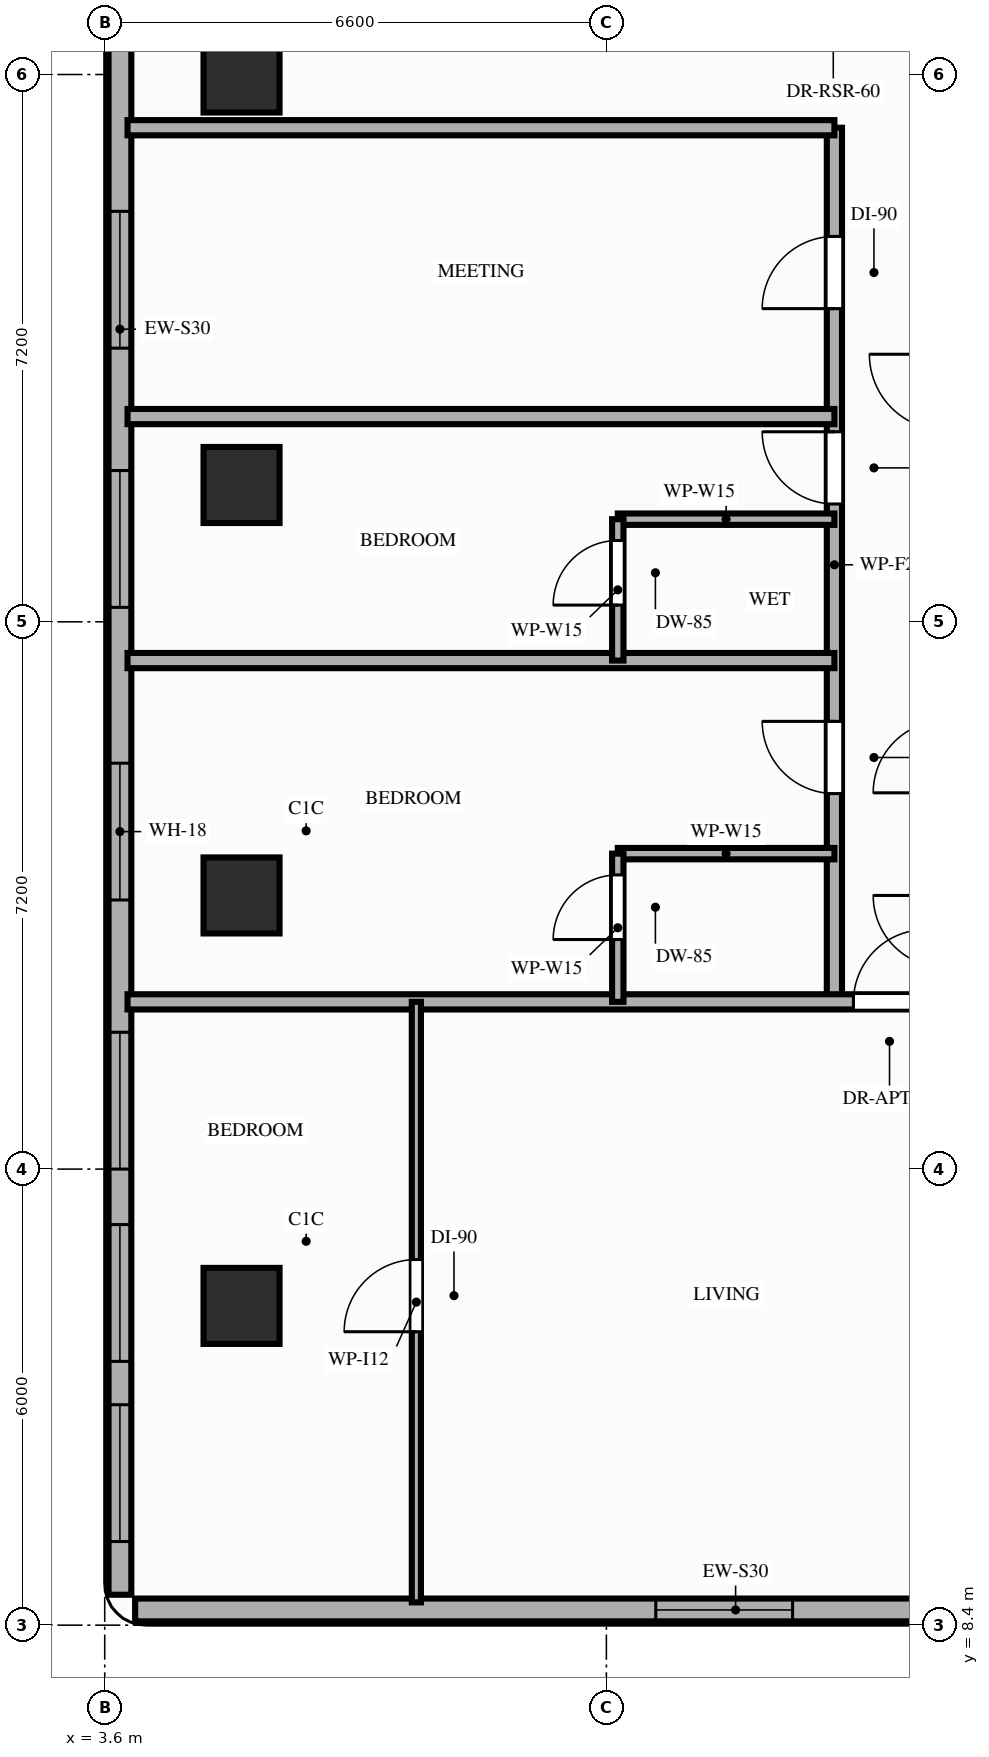
"""IFC4 building model, lengths in metres.
Left out: names, types, materials, properties, quantities, classifications, styles, units other than length and angle.
Written with IfcOpenShell. Run it as: python <this file> out.ifc"""

import sys

from ifc_helpers import new_model, si_unit, direction, frame, frame_2d, origin, origin_2d, place, context, subcontext, project, spatial, rectangle, extrude, element, fill, save


model = new_model("IFC4")
c1 = context("Model", 3, precision=1e-05, world=origin(), true_north=direction((0.0, 1.0)))
c2 = subcontext(c1, "Body", "Model", "MODEL_VIEW")
j1 = project(units=[si_unit("LENGTHUNIT", "METRE"), si_unit("PLANEANGLEUNIT", "RADIAN")], contexts=[c1])
p1 = place(None, origin())
s1 = spatial("IfcSite", under=j1, at=p1, CompositionType="ELEMENT")
p2 = place(p1, origin())
s2 = spatial("IfcBuilding", under=s1, at=p2, CompositionType="ELEMENT")
p3 = place(p2, frame((0.0, 0.0, 149.0)))
s3 = spatial("IfcBuildingStorey", under=s2, at=p3, CompositionType="ELEMENT", Elevation=149.0)
for number, where, z_axis, x_axis in (
    (1, (5.4, 12.6, 0.0), (0.0, 0.0, 1.0), (1.0, 0.0, 0.0)),
    (2, (5.4, 18.0, 0.0), (0.0, 0.0, 1.0), (1.0, 0.0, 0.0)),
    (3, (5.4, 23.4, 0.0), (0.0, 0.0, 1.0), (1.0, 0.0, 0.0)),
    (4, (5.4, 28.8, 0.0), (0.0, 0.0, 1.0), (1.0, 0.0, 0.0)),
):
    element("IfcColumn", number, at=place(p3, frame(where, z_axis=z_axis, x_axis=x_axis)), inside=s3, PredefinedType="COLUMN", context=c2, shape_type="SweptSolid", body=[
        extrude(rectangle(XDim=1.0, YDim=1.0, at=origin_2d()), origin(), (0.0, 0.0, 1.0), 3.2),
    ])
p4 = place(p3, frame((4.0, 8.6, 0.0), z_axis=(0.0, 0.0, 1.0), x_axis=(1.0, 0.0, 0.0)))
e5 = element("IfcWall", 5, at=p4, inside=s3, PredefinedType="STANDARD", context=c2, shape_type="SweptSolid", body=[
    extrude(rectangle(XDim=15.8, YDim=0.3, at=frame_2d((7.9, 0.0))), origin(), (0.0, 0.0, 1.0), 2.96),
])
p5 = place(p4, frame((6.85, 0.0, 0.85)))
e6 = element("IfcOpeningElement", 6, at=p5, cuts=e5, PredefinedType="OPENING", context=c2, shape_type="SweptSolid", body=[
    extrude(rectangle(XDim=1.8, YDim=1.75, at=frame_2d((0.9, 0.875))), frame((0.0, 0.16, 0.0), z_axis=(0.0, -1.0, 0.0), x_axis=(1.0, 0.0, 0.0)), (0.0, 0.0, 1.0), 0.32),
])
p6 = place(p3, frame((3.8, 42.1, 0.0), z_axis=(0.0, 0.0, 1.0), x_axis=(0.0, -1.0, 0.0)))
e7 = element("IfcWall", 7, at=p6, inside=s3, PredefinedType="STANDARD", context=c2, shape_type="SweptSolid", body=[
    extrude(rectangle(XDim=33.3, YDim=0.3, at=frame_2d((16.65, 0.0))), origin(), (0.0, 0.0, 1.0), 2.67),
])
p7 = place(p6, frame((22.36, 0.0, 0.85)))
e8 = element("IfcOpeningElement", 8, at=p7, cuts=e7, PredefinedType="OPENING", context=c2, shape_type="SweptSolid", body=[
    extrude(rectangle(XDim=1.8, YDim=1.57, at=frame_2d((0.9, 0.785))), frame((0.0, 0.16, 0.0), z_axis=(0.0, -1.0, 0.0), x_axis=(1.0, 0.0, 0.0)), (0.0, 0.0, 1.0), 0.32),
])
p8 = place(p6, frame((18.51, 0.0, 0.85)))
e9 = element("IfcOpeningElement", 9, at=p8, cuts=e7, PredefinedType="OPENING", context=c2, shape_type="SweptSolid", body=[
    extrude(rectangle(XDim=1.8, YDim=1.57, at=frame_2d((0.9, 0.785))), frame((0.0, 0.16, 0.0), z_axis=(0.0, -1.0, 0.0), x_axis=(1.0, 0.0, 0.0)), (0.0, 0.0, 1.0), 0.32),
])
p9 = place(p6, frame((28.43, 0.0, 0.85)))
e10 = element("IfcOpeningElement", 10, at=p9, cuts=e7, PredefinedType="OPENING", context=c2, shape_type="SweptSolid", body=[
    extrude(rectangle(XDim=1.8, YDim=1.57, at=frame_2d((0.9, 0.785))), frame((0.0, 0.16, 0.0), z_axis=(0.0, -1.0, 0.0), x_axis=(1.0, 0.0, 0.0)), (0.0, 0.0, 1.0), 0.32),
])
p10 = place(p6, frame((30.8, 0.0, 0.85)))
e11 = element("IfcOpeningElement", 11, at=p10, cuts=e7, PredefinedType="OPENING", context=c2, shape_type="SweptSolid", body=[
    extrude(rectangle(XDim=1.8, YDim=1.57, at=frame_2d((0.9, 0.785))), frame((0.0, 0.16, 0.0), z_axis=(0.0, -1.0, 0.0), x_axis=(1.0, 0.0, 0.0)), (0.0, 0.0, 1.0), 0.32),
])
p11 = place(p6, frame((25.9, 0.0, 0.85)))
e12 = element("IfcOpeningElement", 12, at=p11, cuts=e7, PredefinedType="OPENING", context=c2, shape_type="SweptSolid", body=[
    extrude(rectangle(XDim=1.8, YDim=1.57, at=frame_2d((0.9, 0.785))), frame((0.0, 0.16, 0.0), z_axis=(0.0, -1.0, 0.0), x_axis=(1.0, 0.0, 0.0)), (0.0, 0.0, 1.0), 0.32),
])
p12 = place(p6, frame((15.1, 0.0, 0.85)))
e13 = element("IfcOpeningElement", 13, at=p12, cuts=e7, PredefinedType="OPENING", context=c2, shape_type="SweptSolid", body=[
    extrude(rectangle(XDim=1.8, YDim=1.57, at=frame_2d((0.9, 0.785))), frame((0.0, 0.16, 0.0), z_axis=(0.0, -1.0, 0.0), x_axis=(1.0, 0.0, 0.0)), (0.0, 0.0, 1.0), 0.32),
])
p13 = place(p6, frame((9.9, 0.0, 0.85)))
e14 = element("IfcOpeningElement", 14, at=p13, cuts=e7, PredefinedType="OPENING", context=c2, shape_type="SweptSolid", body=[
    extrude(rectangle(XDim=1.8, YDim=1.57, at=frame_2d((0.9, 0.785))), frame((0.0, 0.16, 0.0), z_axis=(0.0, -1.0, 0.0), x_axis=(1.0, 0.0, 0.0)), (0.0, 0.0, 1.0), 0.32),
])
p14 = place(p6, frame((3.8, 0.0, 0.85)))
e15 = element("IfcOpeningElement", 15, at=p14, cuts=e7, PredefinedType="OPENING", context=c2, shape_type="SweptSolid", body=[
    extrude(rectangle(XDim=1.8, YDim=1.57, at=frame_2d((0.9, 0.785))), frame((0.0, 0.16, 0.0), z_axis=(0.0, -1.0, 0.0), x_axis=(1.0, 0.0, 0.0)), (0.0, 0.0, 1.0), 0.32),
])
p15 = place(p3, frame((13.2, 16.6, 0.0), z_axis=(0.0, 0.0, 1.0), x_axis=(0.0, 1.0, 0.0)))
e16 = element("IfcWall", 16, at=p15, inside=s3, PredefinedType="PARTITIONING", context=c2, shape_type="SweptSolid", body=[
    extrude(rectangle(XDim=11.5, YDim=0.2, at=frame_2d((5.75, 0.0))), origin(), (0.0, 0.0, 1.0), 2.4),
])
p16 = place(p15, frame((2.74, 0.0, 0.0)))
e17 = element("IfcOpeningElement", 17, at=p16, cuts=e16, PredefinedType="OPENING", context=c2, shape_type="SweptSolid", body=[
    extrude(rectangle(XDim=0.95, YDim=2.15, at=frame_2d((0.475, 1.075))), frame((0.0, 0.11, 0.0), z_axis=(0.0, -1.0, 0.0), x_axis=(1.0, 0.0, 0.0)), (0.0, 0.0, 1.0), 0.22),
])
p17 = place(p15, frame((6.55, 0.0, 0.0)))
e18 = element("IfcOpeningElement", 18, at=p17, cuts=e16, PredefinedType="OPENING", context=c2, shape_type="SweptSolid", body=[
    extrude(rectangle(XDim=0.95, YDim=2.15, at=frame_2d((0.475, 1.075))), frame((0.0, 0.11, 0.0), z_axis=(0.0, -1.0, 0.0), x_axis=(1.0, 0.0, 0.0)), (0.0, 0.0, 1.0), 0.22),
])
p18 = place(p15, frame((9.12, 0.0, 0.0)))
e19 = element("IfcOpeningElement", 19, at=p18, cuts=e16, PredefinedType="OPENING", context=c2, shape_type="SweptSolid", body=[
    extrude(rectangle(XDim=0.95, YDim=2.15, at=frame_2d((0.475, 1.075))), frame((0.0, 0.11, 0.0), z_axis=(0.0, -1.0, 0.0), x_axis=(1.0, 0.0, 0.0)), (0.0, 0.0, 1.0), 0.22),
])
p19 = place(p3, frame((3.9, 16.6, 0.0), z_axis=(0.0, 0.0, 1.0), x_axis=(1.0, 0.0, 0.0)))
e20 = element("IfcWall", 20, at=p19, inside=s3, PredefinedType="PARTITIONING", context=c2, shape_type="SweptSolid", body=[
    extrude(rectangle(XDim=16.0, YDim=0.2, at=frame_2d((8.0, 0.0))), origin(), (0.0, 0.0, 1.0), 2.4),
])
p20 = place(p19, frame((9.55, 0.0, 0.0)))
e21 = element("IfcOpeningElement", 21, at=p20, cuts=e20, PredefinedType="OPENING", context=c2, shape_type="SweptSolid", body=[
    extrude(rectangle(XDim=0.95, YDim=2.15, at=frame_2d((0.475, 1.075))), frame((0.0, 0.11, 0.0), z_axis=(0.0, -1.0, 0.0), x_axis=(1.0, 0.0, 0.0)), (0.0, 0.0, 1.0), 0.22),
])
p21 = place(p3, frame((3.9, 28.1, 0.0), z_axis=(0.0, 0.0, 1.0), x_axis=(1.0, 0.0, 0.0)))
e22 = element("IfcWall", 22, at=p21, inside=s3, PredefinedType="PARTITIONING", context=c2, shape_type="SweptSolid", body=[
    extrude(rectangle(XDim=9.3, YDim=0.2, at=frame_2d((4.65, 0.0))), origin(), (0.0, 0.0, 1.0), 2.4),
])
p22 = place(p3, frame((10.35, 18.55, 0.0), z_axis=(0.0, 0.0, 1.0), x_axis=(1.0, 0.0, 0.0)))
e23 = element("IfcWall", 23, at=p22, inside=s3, PredefinedType="PARTITIONING", context=c2, shape_type="SweptSolid", body=[
    extrude(rectangle(XDim=2.85, YDim=0.15, at=frame_2d((1.425, 0.0))), origin(), (0.0, 0.0, 1.0), 2.96),
])
p23 = place(p3, frame((10.35, 16.6, 0.0), z_axis=(0.0, 0.0, 1.0), x_axis=(0.0, 1.0, 0.0)))
e24 = element("IfcWall", 24, at=p23, inside=s3, PredefinedType="PARTITIONING", context=c2, shape_type="SweptSolid", body=[
    extrude(rectangle(XDim=1.95, YDim=0.15, at=frame_2d((0.975, 0.0))), origin(), (0.0, 0.0, 1.0), 2.4),
])
p24 = place(p23, frame((0.82, 0.0, 0.0)))
e25 = element("IfcOpeningElement", 25, at=p24, cuts=e24, PredefinedType="OPENING", context=c2, shape_type="SweptSolid", body=[
    extrude(rectangle(XDim=0.85, YDim=2.1, at=frame_2d((0.425, 1.05))), frame((0.0, 0.085, 0.0), z_axis=(0.0, -1.0, 0.0), x_axis=(1.0, 0.0, 0.0)), (0.0, 0.0, 1.0), 0.17),
])
p25 = place(p3, frame((3.9, 21.09, 0.0), z_axis=(0.0, 0.0, 1.0), x_axis=(1.0, 0.0, 0.0)))
e26 = element("IfcWall", 26, at=p25, inside=s3, PredefinedType="PARTITIONING", context=c2, shape_type="SweptSolid", body=[
    extrude(rectangle(XDim=9.3, YDim=0.2, at=frame_2d((4.65, 0.0))), origin(), (0.0, 0.0, 1.0), 2.4),
])
p26 = place(p3, frame((10.35, 22.95, 0.0), z_axis=(0.0, 0.0, 1.0), x_axis=(1.0, 0.0, 0.0)))
e27 = element("IfcWall", 27, at=p26, inside=s3, PredefinedType="PARTITIONING", context=c2, shape_type="SweptSolid", body=[
    extrude(rectangle(XDim=2.85, YDim=0.15, at=frame_2d((1.425, 0.0))), origin(), (0.0, 0.0, 1.0), 2.96),
])
p27 = place(p3, frame((10.35, 21.09, 0.0), z_axis=(0.0, 0.0, 1.0), x_axis=(0.0, 1.0, 0.0)))
e28 = element("IfcWall", 28, at=p27, inside=s3, PredefinedType="PARTITIONING", context=c2, shape_type="SweptSolid", body=[
    extrude(rectangle(XDim=1.86, YDim=0.15, at=frame_2d((0.93, 0.0))), origin(), (0.0, 0.0, 1.0), 2.55),
])
p28 = place(p27, frame((0.73, 0.0, 0.0)))
e29 = element("IfcOpeningElement", 29, at=p28, cuts=e28, PredefinedType="OPENING", context=c2, shape_type="SweptSolid", body=[
    extrude(rectangle(XDim=0.85, YDim=2.1, at=frame_2d((0.425, 1.05))), frame((0.0, 0.085, 0.0), z_axis=(0.0, -1.0, 0.0), x_axis=(1.0, 0.0, 0.0)), (0.0, 0.0, 1.0), 0.17),
])
p29 = place(p3, frame((3.9, 24.3, 0.0), z_axis=(0.0, 0.0, 1.0), x_axis=(1.0, 0.0, 0.0)))
e30 = element("IfcWall", 30, at=p29, inside=s3, PredefinedType="PARTITIONING", context=c2, shape_type="SweptSolid", body=[
    extrude(rectangle(XDim=9.3, YDim=0.2, at=frame_2d((4.65, 0.0))), origin(), (0.0, 0.0, 1.0), 2.4),
])
p30 = place(p3, frame((7.7, 8.7, 0.0), z_axis=(0.0, 0.0, 1.0), x_axis=(0.0, 1.0, 0.0)))
e31 = element("IfcWall", 31, at=p30, inside=s3, PredefinedType="PARTITIONING", context=c2, shape_type="SweptSolid", body=[
    extrude(rectangle(XDim=7.9, YDim=0.12, at=frame_2d((3.95, 0.0))), origin(), (0.0, 0.0, 1.0), 2.4),
])
p31 = place(p30, frame((3.56, 0.0, 0.0)))
e32 = element("IfcOpeningElement", 32, at=p31, cuts=e31, PredefinedType="OPENING", context=c2, shape_type="SweptSolid", body=[
    extrude(rectangle(XDim=0.95, YDim=2.15, at=frame_2d((0.475, 1.075))), frame((0.0, 0.07, 0.0), z_axis=(0.0, -1.0, 0.0), x_axis=(1.0, 0.0, 0.0)), (0.0, 0.0, 1.0), 0.14),
])
p32 = place(p7, origin())
e33 = element("IfcWindow", 33, at=p32, inside=s3, PartitioningType="SINGLE_PANEL", PredefinedType="WINDOW", context=c2, shape_type="SweptSolid", body=[
    extrude(rectangle(XDim=1.8, YDim=1.57, at=frame_2d((0.9, 0.785))), frame((0.0, 0.03, 0.0), z_axis=(0.0, -1.0, 0.0), x_axis=(1.0, 0.0, 0.0)), (0.0, 0.0, 1.0), 0.06),
])
fill(e8, e33)
p33 = place(p8, origin())
e34 = element("IfcWindow", 34, at=p33, inside=s3, PartitioningType="SINGLE_PANEL", PredefinedType="WINDOW", context=c2, shape_type="SweptSolid", body=[
    extrude(rectangle(XDim=1.8, YDim=1.57, at=frame_2d((0.9, 0.785))), frame((0.0, 0.03, 0.0), z_axis=(0.0, -1.0, 0.0), x_axis=(1.0, 0.0, 0.0)), (0.0, 0.0, 1.0), 0.06),
])
fill(e9, e34)
p34 = place(p9, origin())
e35 = element("IfcWindow", 35, at=p34, inside=s3, PartitioningType="SINGLE_PANEL", PredefinedType="WINDOW", context=c2, shape_type="SweptSolid", body=[
    extrude(rectangle(XDim=1.8, YDim=1.57, at=frame_2d((0.9, 0.785))), frame((0.0, 0.03, 0.0), z_axis=(0.0, -1.0, 0.0), x_axis=(1.0, 0.0, 0.0)), (0.0, 0.0, 1.0), 0.06),
])
fill(e10, e35)
p35 = place(p5, origin())
e36 = element("IfcWindow", 36, at=p35, inside=s3, PartitioningType="SINGLE_PANEL", PredefinedType="WINDOW", context=c2, shape_type="SweptSolid", body=[
    extrude(rectangle(XDim=1.8, YDim=1.75, at=frame_2d((0.9, 0.875))), frame((0.0, 0.03, 0.0), z_axis=(0.0, -1.0, 0.0), x_axis=(1.0, 0.0, 0.0)), (0.0, 0.0, 1.0), 0.06),
])
fill(e6, e36)
p36 = place(p10, origin())
e37 = element("IfcWindow", 37, at=p36, inside=s3, PartitioningType="SINGLE_PANEL", PredefinedType="WINDOW", context=c2, shape_type="SweptSolid", body=[
    extrude(rectangle(XDim=1.8, YDim=1.57, at=frame_2d((0.9, 0.785))), frame((0.0, 0.03, 0.0), z_axis=(0.0, -1.0, 0.0), x_axis=(1.0, 0.0, 0.0)), (0.0, 0.0, 1.0), 0.06),
])
fill(e11, e37)
p37 = place(p11, origin())
e38 = element("IfcWindow", 38, at=p37, inside=s3, PartitioningType="SINGLE_PANEL", PredefinedType="WINDOW", context=c2, shape_type="SweptSolid", body=[
    extrude(rectangle(XDim=1.8, YDim=1.57, at=frame_2d((0.9, 0.785))), frame((0.0, 0.03, 0.0), z_axis=(0.0, -1.0, 0.0), x_axis=(1.0, 0.0, 0.0)), (0.0, 0.0, 1.0), 0.06),
])
fill(e12, e38)
p38 = place(p12, origin())
e39 = element("IfcWindow", 39, at=p38, inside=s3, PartitioningType="SINGLE_PANEL", PredefinedType="WINDOW", context=c2, shape_type="SweptSolid", body=[
    extrude(rectangle(XDim=1.8, YDim=1.57, at=frame_2d((0.9, 0.785))), frame((0.0, 0.03, 0.0), z_axis=(0.0, -1.0, 0.0), x_axis=(1.0, 0.0, 0.0)), (0.0, 0.0, 1.0), 0.06),
])
fill(e13, e39)
p39 = place(p24, origin())
e40 = element("IfcDoor", 40, at=p39, inside=s3, OperationType="SINGLE_SWING_LEFT", PredefinedType="DOOR", context=c2, shape_type="SweptSolid", body=[
    extrude(rectangle(XDim=0.85, YDim=2.1, at=frame_2d((0.425, 1.05))), frame((0.0, 0.025, 0.0), z_axis=(0.0, -1.0, 0.0), x_axis=(1.0, 0.0, 0.0)), (0.0, 0.0, 1.0), 0.05),
])
fill(e25, e40)
p40 = place(p16, origin())
e41 = element("IfcDoor", 41, at=p40, inside=s3, OperationType="SINGLE_SWING_RIGHT", PredefinedType="DOOR", context=c2, shape_type="SweptSolid", body=[
    extrude(rectangle(XDim=0.95, YDim=2.15, at=frame_2d((0.475, 1.075))), frame((0.0, 0.025, 0.0), z_axis=(0.0, -1.0, 0.0), x_axis=(1.0, 0.0, 0.0)), (0.0, 0.0, 1.0), 0.05),
])
fill(e17, e41)
p41 = place(p28, origin())
e42 = element("IfcDoor", 42, at=p41, inside=s3, OperationType="SINGLE_SWING_LEFT", PredefinedType="DOOR", context=c2, shape_type="SweptSolid", body=[
    extrude(rectangle(XDim=0.85, YDim=2.1, at=frame_2d((0.425, 1.05))), frame((0.0, 0.025, 0.0), z_axis=(0.0, -1.0, 0.0), x_axis=(1.0, 0.0, 0.0)), (0.0, 0.0, 1.0), 0.05),
])
fill(e29, e42)
p42 = place(p17, origin())
e43 = element("IfcDoor", 43, at=p42, inside=s3, OperationType="SINGLE_SWING_RIGHT", PredefinedType="DOOR", context=c2, shape_type="SweptSolid", body=[
    extrude(rectangle(XDim=0.95, YDim=2.15, at=frame_2d((0.475, 1.075))), frame((0.0, 0.025, 0.0), z_axis=(0.0, -1.0, 0.0), x_axis=(1.0, 0.0, 0.0)), (0.0, 0.0, 1.0), 0.05),
])
fill(e18, e43)
p43 = place(p18, origin())
e44 = element("IfcDoor", 44, at=p43, inside=s3, OperationType="SINGLE_SWING_LEFT", PredefinedType="DOOR", context=c2, shape_type="SweptSolid", body=[
    extrude(rectangle(XDim=0.95, YDim=2.15, at=frame_2d((0.475, 1.075))), frame((0.0, 0.025, 0.0), z_axis=(0.0, -1.0, 0.0), x_axis=(1.0, 0.0, 0.0)), (0.0, 0.0, 1.0), 0.05),
])
fill(e19, e44)
p44 = place(p20, origin())
e45 = element("IfcDoor", 45, at=p44, inside=s3, OperationType="SINGLE_SWING_RIGHT", PredefinedType="DOOR", context=c2, shape_type="SweptSolid", body=[
    extrude(rectangle(XDim=0.95, YDim=2.15, at=frame_2d((0.475, 1.075))), frame((0.0, 0.025, 0.0), z_axis=(0.0, -1.0, 0.0), x_axis=(1.0, 0.0, 0.0)), (0.0, 0.0, 1.0), 0.05),
])
fill(e21, e45)
p45 = place(p31, origin())
e46 = element("IfcDoor", 46, at=p45, inside=s3, OperationType="SINGLE_SWING_LEFT", PredefinedType="DOOR", context=c2, shape_type="SweptSolid", body=[
    extrude(rectangle(XDim=0.95, YDim=2.15, at=frame_2d((0.475, 1.075))), frame((0.0, 0.025, 0.0), z_axis=(0.0, -1.0, 0.0), x_axis=(1.0, 0.0, 0.0)), (0.0, 0.0, 1.0), 0.05),
])
fill(e32, e46)
save(model, sys.argv[1])
